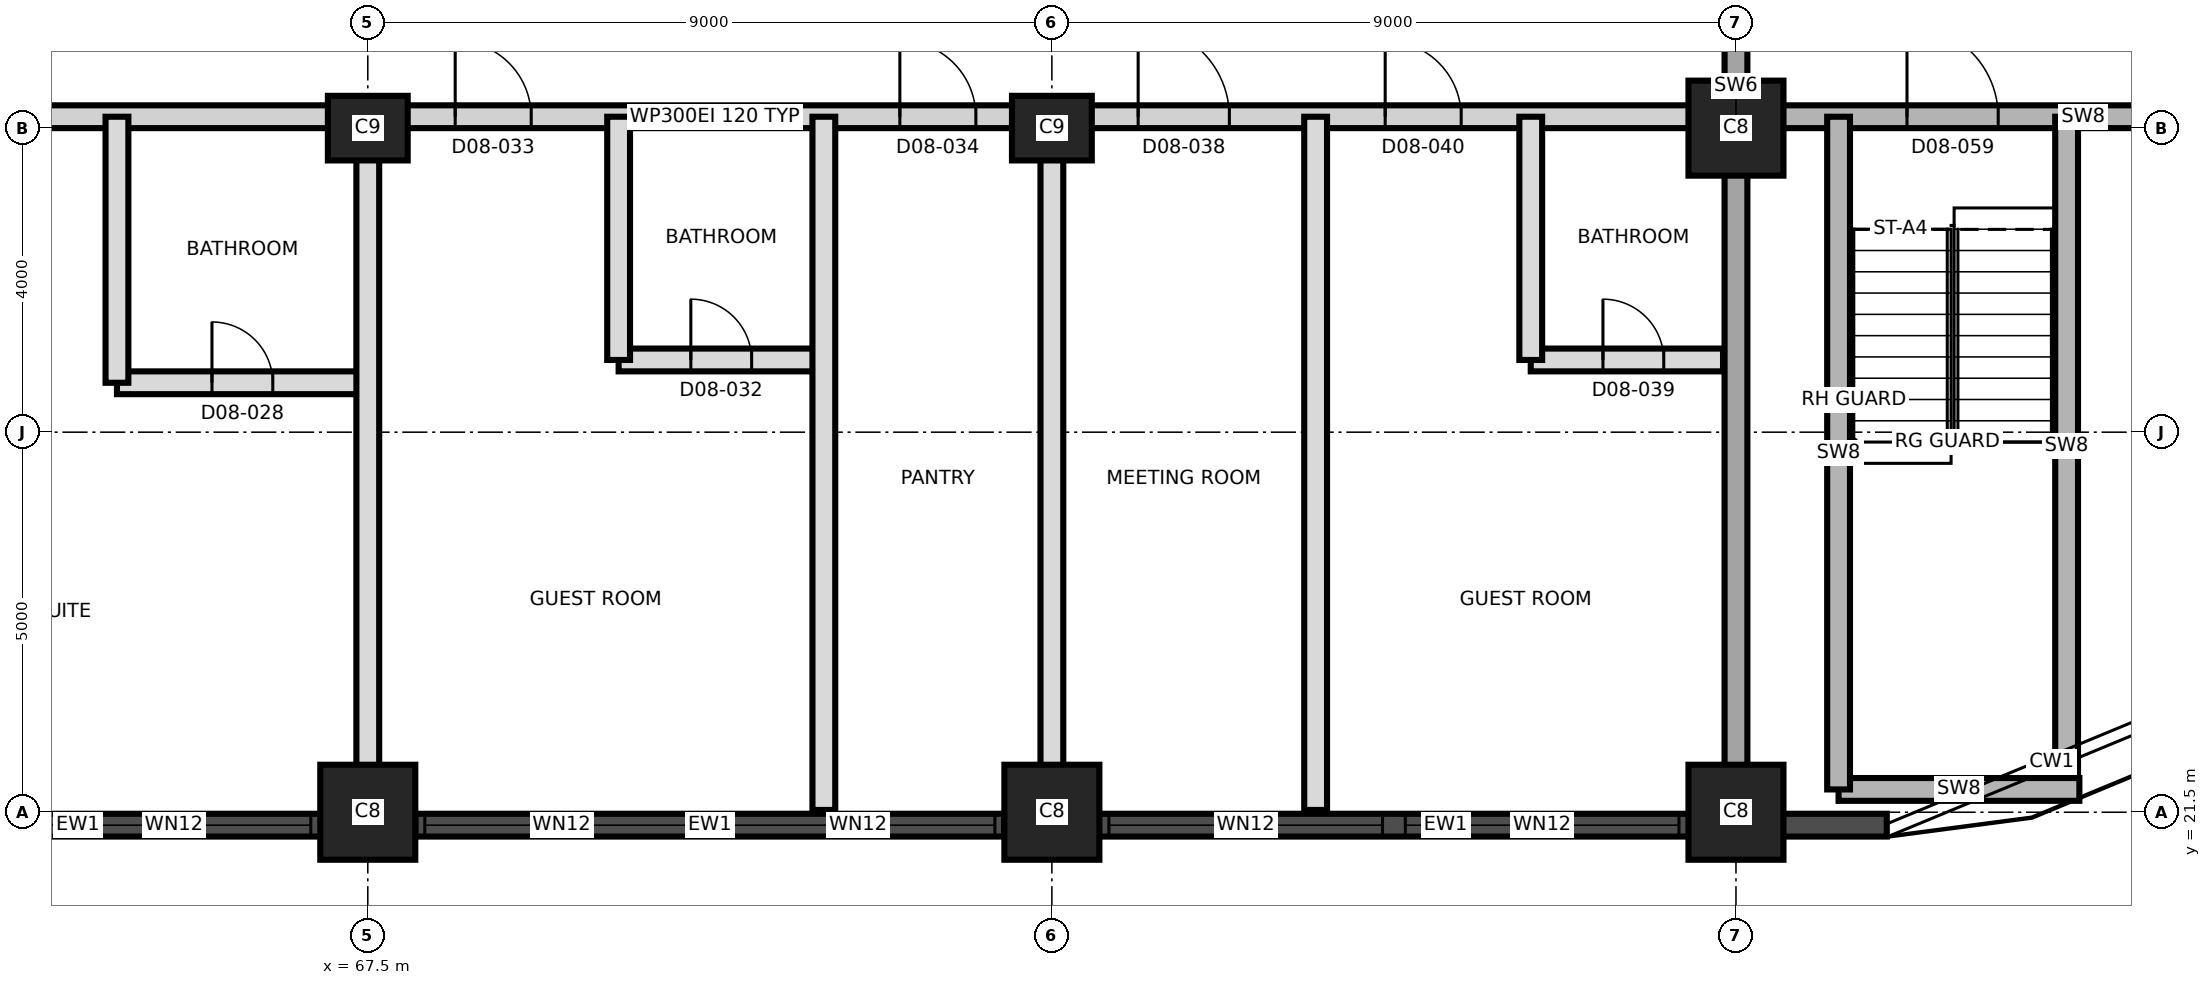
"""IFC4 building model, lengths in metres.
Left out: names, types, materials, properties, quantities, classifications, styles, units other than length and angle.
Written with IfcOpenShell. Run it as: python <this file> out.ifc"""

import sys

from ifc_helpers import new_model, si_unit, direction, frame, frame_2d, origin, origin_2d, place, context, subcontext, project, spatial, rectangle, extrude, element, fill, save


model = new_model("IFC4")
c1 = context("Model", 3, precision=1e-05, world=origin(), true_north=direction((0.0, 1.0)))
c2 = subcontext(c1, "Body", "Model", "MODEL_VIEW")
j1 = project(units=[si_unit("LENGTHUNIT", "METRE"), si_unit("PLANEANGLEUNIT", "RADIAN")], contexts=[c1])
p1 = place(None, origin())
s1 = spatial("IfcSite", under=j1, at=p1, CompositionType="ELEMENT")
p2 = place(p1, origin())
s2 = spatial("IfcBuilding", under=s1, at=p2, CompositionType="ELEMENT")
p3 = place(p2, frame((0.0, 0.0, 98.2)))
s3 = spatial("IfcBuildingStorey", under=s2, at=p3, CompositionType="ELEMENT", Elevation=98.2)
for number, where, z_axis, x_axis in (
    (1, (67.5, 21.5, 0.0), (0.0, 0.0, 1.0), (1.0, 0.0, 0.0)),
    (2, (76.5, 21.5, 0.0), (0.0, 0.0, 1.0), (1.0, 0.0, 0.0)),
    (3, (85.5, 21.5, 0.0), (0.0, 0.0, 1.0), (1.0, 0.0, 0.0)),
):
    element("IfcColumn", number, at=place(p3, frame(where, z_axis=z_axis, x_axis=x_axis)), inside=s3, PredefinedType="COLUMN", context=c2, shape_type="SweptSolid", body=[
        extrude(rectangle(XDim=1.25, YDim=1.25, at=origin_2d()), origin(), (0.0, 0.0, 1.0), 3.7),
    ])
for number, where, z_axis, x_axis in (
    (4, (67.5, 30.5, 0.0), (0.0, 0.0, 1.0), (1.0, 0.0, 0.0)),
    (5, (76.5, 30.5, 0.0), (0.0, 0.0, 1.0), (1.0, 0.0, 0.0)),
):
    element("IfcColumn", number, at=place(p3, frame(where, z_axis=z_axis, x_axis=x_axis)), inside=s3, PredefinedType="COLUMN", context=c2, shape_type="SweptSolid", body=[
        extrude(rectangle(XDim=1.05, YDim=0.85, at=origin_2d()), origin(), (0.0, 0.0, 1.0), 3.7),
    ])
p4 = place(p3, frame((85.5, 30.5, 0.0), z_axis=(0.0, 0.0, 1.0), x_axis=(1.0, 0.0, 0.0)))
e6 = element("IfcColumn", 6, at=p4, inside=s3, PredefinedType="COLUMN", context=c2, shape_type="SweptSolid", body=[
    extrude(rectangle(XDim=1.25, YDim=1.25, at=origin_2d()), origin(), (0.0, 0.0, 1.0), 3.7),
])
p5 = place(p3, frame((85.5, 21.53, 0.0), z_axis=(0.0, 0.0, 1.0), x_axis=(0.0, 1.0, 0.0)))
e7 = element("IfcWall", 7, at=p5, inside=s3, PredefinedType="SHEAR", context=c2, shape_type="SweptSolid", body=[
    extrude(rectangle(XDim=17.94, YDim=0.3, at=frame_2d((8.97, 0.0))), origin(), (0.0, 0.0, 1.0), 3.7),
])
p6 = place(p5, frame((10.17, 0.0, 0.0)))
e8 = element("IfcOpeningElement", 8, at=p6, cuts=e7, PredefinedType="OPENING", context=c2, shape_type="SweptSolid", body=[
    extrude(rectangle(XDim=1.4, YDim=2.1, at=frame_2d((0.7, 1.05))), frame((0.0, 0.16, 0.0), z_axis=(0.0, -1.0, 0.0), x_axis=(1.0, 0.0, 0.0)), (0.0, 0.0, 1.0), 0.32),
])
p7 = place(p3, frame((59.25, 21.33, 0.0), z_axis=(0.0, 0.0, 1.0), x_axis=(1.0, 0.0, 0.0)))
e9 = element("IfcWall", 9, at=p7, inside=s3, PredefinedType="SOLIDWALL", context=c2, shape_type="SweptSolid", body=[
    extrude(rectangle(XDim=8.875, YDim=0.3, at=frame_2d((4.438, 0.0))), origin(), (0.0, 0.0, 1.0), 3.4),
])
p8 = place(p7, frame((0.975, 0.0, 0.3)))
e10 = element("IfcOpeningElement", 10, at=p8, cuts=e9, PredefinedType="OPENING", context=c2, shape_type="SweptSolid", body=[
    extrude(rectangle(XDim=1.8, YDim=2.4, at=frame_2d((0.9, 1.2))), frame((0.0, 0.16, 0.0), z_axis=(0.0, -1.0, 0.0), x_axis=(1.0, 0.0, 0.0)), (0.0, 0.0, 1.0), 0.32),
])
p9 = place(p7, frame((3.9, 0.0, 0.9)))
e11 = element("IfcOpeningElement", 11, at=p9, cuts=e9, PredefinedType="OPENING", context=c2, shape_type="SweptSolid", body=[
    extrude(rectangle(XDim=3.6, YDim=1.5, at=frame_2d((1.8, 0.75))), frame((0.0, 0.16, 0.0), z_axis=(0.0, -1.0, 0.0), x_axis=(1.0, 0.0, 0.0)), (0.0, 0.0, 1.0), 0.32),
])
p10 = place(p3, frame((68.125, 21.33, 0.0), z_axis=(0.0, 0.0, 1.0), x_axis=(1.0, 0.0, 0.0)))
e12 = element("IfcWall", 12, at=p10, inside=s3, PredefinedType="SOLIDWALL", context=c2, shape_type="SweptSolid", body=[
    extrude(rectangle(XDim=7.75, YDim=0.3, at=frame_2d((3.875, 0.0))), origin(), (0.0, 0.0, 1.0), 2.75),
])
p11 = place(p10, frame((0.125, 0.0, 0.9)))
e13 = element("IfcOpeningElement", 13, at=p11, cuts=e12, PredefinedType="OPENING", context=c2, shape_type="SweptSolid", body=[
    extrude(rectangle(XDim=3.6, YDim=1.5, at=frame_2d((1.8, 0.75))), frame((0.0, 0.16, 0.0), z_axis=(0.0, -1.0, 0.0), x_axis=(1.0, 0.0, 0.0)), (0.0, 0.0, 1.0), 0.32),
])
p12 = place(p10, frame((4.025, 0.0, 0.9)))
e14 = element("IfcOpeningElement", 14, at=p12, cuts=e12, PredefinedType="OPENING", context=c2, shape_type="SweptSolid", body=[
    extrude(rectangle(XDim=3.6, YDim=1.5, at=frame_2d((1.8, 0.75))), frame((0.0, 0.16, 0.0), z_axis=(0.0, -1.0, 0.0), x_axis=(1.0, 0.0, 0.0)), (0.0, 0.0, 1.0), 0.32),
])
p13 = place(p3, frame((75.875, 21.33, 0.0), z_axis=(0.0, 0.0, 1.0), x_axis=(1.0, 0.0, 0.0)))
e15 = element("IfcWall", 15, at=p13, inside=s3, PredefinedType="SOLIDWALL", context=c2, shape_type="SweptSolid", body=[
    extrude(rectangle(XDim=11.609, YDim=0.3, at=frame_2d((5.805, 0.0))), origin(), (0.0, 0.0, 1.0), 3.4),
])
p14 = place(p13, frame((1.375, 0.0, 0.9)))
e16 = element("IfcOpeningElement", 16, at=p14, cuts=e15, PredefinedType="OPENING", context=c2, shape_type="SweptSolid", body=[
    extrude(rectangle(XDim=3.6, YDim=1.5, at=frame_2d((1.8, 0.75))), frame((0.0, 0.16, 0.0), z_axis=(0.0, -1.0, 0.0), x_axis=(1.0, 0.0, 0.0)), (0.0, 0.0, 1.0), 0.32),
])
p15 = place(p13, frame((5.275, 0.0, 0.9)))
e17 = element("IfcOpeningElement", 17, at=p15, cuts=e15, PredefinedType="OPENING", context=c2, shape_type="SweptSolid", body=[
    extrude(rectangle(XDim=3.6, YDim=1.5, at=frame_2d((1.8, 0.75))), frame((0.0, 0.16, 0.0), z_axis=(0.0, -1.0, 0.0), x_axis=(1.0, 0.0, 0.0)), (0.0, 0.0, 1.0), 0.32),
])
p16 = place(p3, frame((86.85, 21.8, 0.0), z_axis=(0.0, 0.0, 1.0), x_axis=(1.0, 0.0, 0.0)))
e18 = element("IfcWall", 18, at=p16, inside=s3, PredefinedType="SHEAR", context=c2, shape_type="SweptSolid", body=[
    extrude(rectangle(XDim=3.168, YDim=0.3, at=frame_2d((1.584, 0.0))), origin(), (0.0, 0.0, 1.0), 3.4),
])
p17 = place(p3, frame((64.2, 27.15, 0.0), z_axis=(0.0, 0.0, 1.0), x_axis=(1.0, 0.0, 0.0)))
e19 = element("IfcWall", 19, at=p17, inside=s3, PredefinedType="PARTITIONING", context=c2, shape_type="SweptSolid", body=[
    extrude(rectangle(XDim=3.3, YDim=0.3, at=frame_2d((1.65, 0.0))), origin(), (0.0, 0.0, 1.0), 3.4),
])
p18 = place(p17, frame((1.25, 0.0, 0.0)))
e20 = element("IfcOpeningElement", 20, at=p18, cuts=e19, PredefinedType="OPENING", context=c2, shape_type="SweptSolid", body=[
    extrude(rectangle(XDim=0.8, YDim=2.1, at=frame_2d((0.4, 1.05))), frame((0.0, 0.16, 0.0), z_axis=(0.0, -1.0, 0.0), x_axis=(1.0, 0.0, 0.0)), (0.0, 0.0, 1.0), 0.32),
])
p19 = place(p3, frame((70.8, 27.45, 0.0), z_axis=(0.0, 0.0, 1.0), x_axis=(1.0, 0.0, 0.0)))
e21 = element("IfcWall", 21, at=p19, inside=s3, PredefinedType="PARTITIONING", context=c2, shape_type="SweptSolid", body=[
    extrude(rectangle(XDim=2.7, YDim=0.3, at=frame_2d((1.35, 0.0))), origin(), (0.0, 0.0, 1.0), 3.4),
])
p20 = place(p19, frame((0.95, 0.0, 0.0)))
e22 = element("IfcOpeningElement", 22, at=p20, cuts=e21, PredefinedType="OPENING", context=c2, shape_type="SweptSolid", body=[
    extrude(rectangle(XDim=0.8, YDim=2.1, at=frame_2d((0.4, 1.05))), frame((0.0, 0.16, 0.0), z_axis=(0.0, -1.0, 0.0), x_axis=(1.0, 0.0, 0.0)), (0.0, 0.0, 1.0), 0.32),
])
p21 = place(p3, frame((82.8, 27.45, 0.0), z_axis=(0.0, 0.0, 1.0), x_axis=(1.0, 0.0, 0.0)))
e23 = element("IfcWall", 23, at=p21, inside=s3, PredefinedType="PARTITIONING", context=c2, shape_type="SweptSolid", body=[
    extrude(rectangle(XDim=2.53, YDim=0.3, at=frame_2d((1.265, 0.0))), origin(), (0.0, 0.0, 1.0), 3.4),
])
p22 = place(p21, frame((0.95, 0.0, 0.0)))
e24 = element("IfcOpeningElement", 24, at=p22, cuts=e23, PredefinedType="OPENING", context=c2, shape_type="SweptSolid", body=[
    extrude(rectangle(XDim=0.8, YDim=2.1, at=frame_2d((0.4, 1.05))), frame((0.0, 0.16, 0.0), z_axis=(0.0, -1.0, 0.0), x_axis=(1.0, 0.0, 0.0)), (0.0, 0.0, 1.0), 0.32),
])
p23 = place(p3, frame((58.8, 30.65, 0.0), z_axis=(0.0, 0.0, 1.0), x_axis=(1.0, 0.0, 0.0)))
e25 = element("IfcWall", 25, at=p23, inside=s3, PredefinedType="PARTITIONING", context=c2, shape_type="SweptSolid", body=[
    extrude(rectangle(XDim=26.53, YDim=0.3, at=frame_2d((13.265, 0.0))), origin(), (0.0, 0.0, 1.0), 3.4),
])
p24 = place(p23, frame((2.05, 0.0, 0.0)))
e26 = element("IfcOpeningElement", 26, at=p24, cuts=e25, PredefinedType="OPENING", context=c2, shape_type="SweptSolid", body=[
    extrude(rectangle(XDim=1.0, YDim=2.4, at=frame_2d((0.5, 1.2))), frame((0.0, 0.16, 0.0), z_axis=(0.0, -1.0, 0.0), x_axis=(1.0, 0.0, 0.0)), (0.0, 0.0, 1.0), 0.32),
])
p25 = place(p23, frame((9.85, 0.0, 0.0)))
e27 = element("IfcOpeningElement", 27, at=p25, cuts=e25, PredefinedType="OPENING", context=c2, shape_type="SweptSolid", body=[
    extrude(rectangle(XDim=1.0, YDim=2.1, at=frame_2d((0.5, 1.05))), frame((0.0, 0.16, 0.0), z_axis=(0.0, -1.0, 0.0), x_axis=(1.0, 0.0, 0.0)), (0.0, 0.0, 1.0), 0.32),
])
p26 = place(p23, frame((15.7, 0.0, 0.0)))
e28 = element("IfcOpeningElement", 28, at=p26, cuts=e25, PredefinedType="OPENING", context=c2, shape_type="SweptSolid", body=[
    extrude(rectangle(XDim=1.0, YDim=2.1, at=frame_2d((0.5, 1.05))), frame((0.0, 0.16, 0.0), z_axis=(0.0, -1.0, 0.0), x_axis=(1.0, 0.0, 0.0)), (0.0, 0.0, 1.0), 0.32),
])
p27 = place(p23, frame((18.835, 0.0, 0.0)))
e29 = element("IfcOpeningElement", 29, at=p27, cuts=e25, PredefinedType="OPENING", context=c2, shape_type="SweptSolid", body=[
    extrude(rectangle(XDim=1.2, YDim=2.1, at=frame_2d((0.6, 1.05))), frame((0.0, 0.16, 0.0), z_axis=(0.0, -1.0, 0.0), x_axis=(1.0, 0.0, 0.0)), (0.0, 0.0, 1.0), 0.32),
])
p28 = place(p23, frame((22.085, 0.0, 0.0)))
e30 = element("IfcOpeningElement", 30, at=p28, cuts=e25, PredefinedType="OPENING", context=c2, shape_type="SweptSolid", body=[
    extrude(rectangle(XDim=1.0, YDim=2.1, at=frame_2d((0.5, 1.05))), frame((0.0, 0.16, 0.0), z_axis=(0.0, -1.0, 0.0), x_axis=(1.0, 0.0, 0.0)), (0.0, 0.0, 1.0), 0.32),
])
p29 = place(p3, frame((85.67, 30.65, 0.0), z_axis=(0.0, 0.0, 1.0), x_axis=(1.0, 0.0, 0.0)))
e31 = element("IfcWall", 31, at=p29, inside=s3, PredefinedType="SHEAR", context=c2, shape_type="SweptSolid", body=[
    extrude(rectangle(XDim=8.8, YDim=0.3, at=frame_2d((4.4, 0.0))), origin(), (0.0, 0.0, 1.0), 3.4),
])
p30 = place(p29, frame((2.08, 0.0, 0.0)))
e32 = element("IfcOpeningElement", 32, at=p30, cuts=e31, PredefinedType="OPENING", context=c2, shape_type="SweptSolid", body=[
    extrude(rectangle(XDim=1.2, YDim=2.1, at=frame_2d((0.6, 1.05))), frame((0.0, 0.16, 0.0), z_axis=(0.0, -1.0, 0.0), x_axis=(1.0, 0.0, 0.0)), (0.0, 0.0, 1.0), 0.32),
])
p31 = place(p29, frame((5.63, 0.0, 0.0)))
e33 = element("IfcOpeningElement", 33, at=p31, cuts=e31, PredefinedType="OPENING", context=c2, shape_type="SweptSolid", body=[
    extrude(rectangle(XDim=1.0, YDim=2.1, at=frame_2d((0.5, 1.05))), frame((0.0, 0.16, 0.0), z_axis=(0.0, -1.0, 0.0), x_axis=(1.0, 0.0, 0.0)), (0.0, 0.0, 1.0), 0.32),
])
p32 = place(p3, frame((64.2, 27.15, 0.0), z_axis=(0.0, 0.0, 1.0), x_axis=(0.0, 1.0, 0.0)))
e34 = element("IfcWall", 34, at=p32, inside=s3, PredefinedType="PARTITIONING", context=c2, shape_type="SweptSolid", body=[
    extrude(rectangle(XDim=3.5, YDim=0.3, at=frame_2d((1.75, 0.0))), origin(), (0.0, 0.0, 1.0), 3.4),
])
p33 = place(p3, frame((67.5, 21.53, 0.0), z_axis=(0.0, 0.0, 1.0), x_axis=(0.0, 1.0, 0.0)))
e35 = element("IfcWall", 35, at=p33, inside=s3, PredefinedType="PARTITIONING", context=c2, shape_type="SweptSolid", body=[
    extrude(rectangle(XDim=9.12, YDim=0.3, at=frame_2d((4.56, 0.0))), origin(), (0.0, 0.0, 1.0), 3.4),
])
p34 = place(p3, frame((70.8, 27.45, 0.0), z_axis=(0.0, 0.0, 1.0), x_axis=(0.0, 1.0, 0.0)))
e36 = element("IfcWall", 36, at=p34, inside=s3, PredefinedType="PARTITIONING", context=c2, shape_type="SweptSolid", body=[
    extrude(rectangle(XDim=3.2, YDim=0.3, at=frame_2d((1.6, 0.0))), origin(), (0.0, 0.0, 1.0), 3.4),
])
for number, where, z_axis, x_axis in (
    (37, (73.5, 21.53, 0.0), (0.0, 0.0, 1.0), (0.0, 1.0, 0.0)),
    (38, (76.5, 21.53, 0.0), (0.0, 0.0, 1.0), (0.0, 1.0, 0.0)),
    (39, (79.97, 21.53, 0.0), (0.0, 0.0, 1.0), (0.0, 1.0, 0.0)),
):
    element("IfcWall", number, at=place(p3, frame(where, z_axis=z_axis, x_axis=x_axis)), inside=s3, PredefinedType="PARTITIONING", context=c2, shape_type="SweptSolid", body=[
        extrude(rectangle(XDim=9.12, YDim=0.3, at=frame_2d((4.56, 0.0))), origin(), (0.0, 0.0, 1.0), 3.4),
    ])
p35 = place(p3, frame((82.8, 27.45, 0.0), z_axis=(0.0, 0.0, 1.0), x_axis=(0.0, 1.0, 0.0)))
e40 = element("IfcWall", 40, at=p35, inside=s3, PredefinedType="PARTITIONING", context=c2, shape_type="SweptSolid", body=[
    extrude(rectangle(XDim=3.2, YDim=0.3, at=frame_2d((1.6, 0.0))), origin(), (0.0, 0.0, 1.0), 3.4),
])
p36 = place(p3, frame((86.85, 21.8, 0.0), z_axis=(0.0, 0.0, 1.0), x_axis=(0.0, 1.0, 0.0)))
e41 = element("IfcWall", 41, at=p36, inside=s3, PredefinedType="SHEAR", context=c2, shape_type="SweptSolid", body=[
    extrude(rectangle(XDim=8.85, YDim=0.3, at=frame_2d((4.425, 0.0))), origin(), (0.0, 0.0, 1.0), 3.4),
])
p37 = place(p3, frame((89.85, 21.997, 0.0), z_axis=(0.0, 0.0, 1.0), x_axis=(0.0, 1.0, 0.0)))
e42 = element("IfcWall", 42, at=p37, inside=s3, PredefinedType="SHEAR", context=c2, shape_type="SweptSolid", body=[
    extrude(rectangle(XDim=8.653, YDim=0.3, at=frame_2d((4.326, 0.0))), origin(), (0.0, 0.0, 1.0), 3.4),
])
p38 = place(p9, origin())
e43 = element("IfcWindow", 43, at=p38, inside=s3, PartitioningType="SINGLE_PANEL", PredefinedType="WINDOW", context=c2, shape_type="SweptSolid", body=[
    extrude(rectangle(XDim=3.6, YDim=1.5, at=frame_2d((1.8, 0.75))), frame((0.0, 0.03, 0.0), z_axis=(0.0, -1.0, 0.0), x_axis=(1.0, 0.0, 0.0)), (0.0, 0.0, 1.0), 0.06),
])
fill(e11, e43)
p39 = place(p11, origin())
e44 = element("IfcWindow", 44, at=p39, inside=s3, PartitioningType="SINGLE_PANEL", PredefinedType="WINDOW", context=c2, shape_type="SweptSolid", body=[
    extrude(rectangle(XDim=3.6, YDim=1.5, at=frame_2d((1.8, 0.75))), frame((0.0, 0.03, 0.0), z_axis=(0.0, -1.0, 0.0), x_axis=(1.0, 0.0, 0.0)), (0.0, 0.0, 1.0), 0.06),
])
fill(e13, e44)
p40 = place(p12, origin())
e45 = element("IfcWindow", 45, at=p40, inside=s3, PartitioningType="SINGLE_PANEL", PredefinedType="WINDOW", context=c2, shape_type="SweptSolid", body=[
    extrude(rectangle(XDim=3.6, YDim=1.5, at=frame_2d((1.8, 0.75))), frame((0.0, 0.03, 0.0), z_axis=(0.0, -1.0, 0.0), x_axis=(1.0, 0.0, 0.0)), (0.0, 0.0, 1.0), 0.06),
])
fill(e14, e45)
p41 = place(p14, origin())
e46 = element("IfcWindow", 46, at=p41, inside=s3, PartitioningType="SINGLE_PANEL", PredefinedType="WINDOW", context=c2, shape_type="SweptSolid", body=[
    extrude(rectangle(XDim=3.6, YDim=1.5, at=frame_2d((1.8, 0.75))), frame((0.0, 0.03, 0.0), z_axis=(0.0, -1.0, 0.0), x_axis=(1.0, 0.0, 0.0)), (0.0, 0.0, 1.0), 0.06),
])
fill(e16, e46)
p42 = place(p15, origin())
e47 = element("IfcWindow", 47, at=p42, inside=s3, PartitioningType="SINGLE_PANEL", PredefinedType="WINDOW", context=c2, shape_type="SweptSolid", body=[
    extrude(rectangle(XDim=3.6, YDim=1.5, at=frame_2d((1.8, 0.75))), frame((0.0, 0.03, 0.0), z_axis=(0.0, -1.0, 0.0), x_axis=(1.0, 0.0, 0.0)), (0.0, 0.0, 1.0), 0.06),
])
fill(e17, e47)
p43 = place(p18, origin())
e48 = element("IfcDoor", 48, at=p43, inside=s3, OperationType="SINGLE_SWING_LEFT", PredefinedType="DOOR", context=c2, shape_type="SweptSolid", body=[
    extrude(rectangle(XDim=0.8, YDim=2.1, at=frame_2d((0.4, 1.05))), frame((0.0, 0.025, 0.0), z_axis=(0.0, -1.0, 0.0), x_axis=(1.0, 0.0, 0.0)), (0.0, 0.0, 1.0), 0.05),
])
fill(e20, e48)
p44 = place(p20, origin())
e49 = element("IfcDoor", 49, at=p44, inside=s3, OperationType="SINGLE_SWING_RIGHT", PredefinedType="DOOR", context=c2, shape_type="SweptSolid", body=[
    extrude(rectangle(XDim=0.8, YDim=2.1, at=frame_2d((0.4, 1.05))), frame((0.0, 0.025, 0.0), z_axis=(0.0, -1.0, 0.0), x_axis=(1.0, 0.0, 0.0)), (0.0, 0.0, 1.0), 0.05),
])
fill(e22, e49)
p45 = place(p25, origin())
e50 = element("IfcDoor", 50, at=p45, inside=s3, OperationType="SINGLE_SWING_LEFT", PredefinedType="DOOR", context=c2, shape_type="SweptSolid", body=[
    extrude(rectangle(XDim=1.0, YDim=2.1, at=frame_2d((0.5, 1.05))), frame((0.0, 0.025, 0.0), z_axis=(0.0, -1.0, 0.0), x_axis=(1.0, 0.0, 0.0)), (0.0, 0.0, 1.0), 0.05),
])
fill(e27, e50)
p46 = place(p26, origin())
e51 = element("IfcDoor", 51, at=p46, inside=s3, OperationType="SINGLE_SWING_LEFT", PredefinedType="DOOR", context=c2, shape_type="SweptSolid", body=[
    extrude(rectangle(XDim=1.0, YDim=2.1, at=frame_2d((0.5, 1.05))), frame((0.0, 0.025, 0.0), z_axis=(0.0, -1.0, 0.0), x_axis=(1.0, 0.0, 0.0)), (0.0, 0.0, 1.0), 0.05),
])
fill(e28, e51)
p47 = place(p27, origin())
e52 = element("IfcDoor", 52, at=p47, inside=s3, OperationType="SINGLE_SWING_LEFT", PredefinedType="DOOR", context=c2, shape_type="SweptSolid", body=[
    extrude(rectangle(XDim=1.2, YDim=2.1, at=frame_2d((0.6, 1.05))), frame((0.0, 0.025, 0.0), z_axis=(0.0, -1.0, 0.0), x_axis=(1.0, 0.0, 0.0)), (0.0, 0.0, 1.0), 0.05),
])
fill(e29, e52)
p48 = place(p22, origin())
e53 = element("IfcDoor", 53, at=p48, inside=s3, OperationType="SINGLE_SWING_LEFT", PredefinedType="DOOR", context=c2, shape_type="SweptSolid", body=[
    extrude(rectangle(XDim=0.8, YDim=2.1, at=frame_2d((0.4, 1.05))), frame((0.0, 0.025, 0.0), z_axis=(0.0, -1.0, 0.0), x_axis=(1.0, 0.0, 0.0)), (0.0, 0.0, 1.0), 0.05),
])
fill(e24, e53)
p49 = place(p28, origin())
e54 = element("IfcDoor", 54, at=p49, inside=s3, OperationType="SINGLE_SWING_RIGHT", PredefinedType="DOOR", context=c2, shape_type="SweptSolid", body=[
    extrude(rectangle(XDim=1.0, YDim=2.1, at=frame_2d((0.5, 1.05))), frame((0.0, 0.025, 0.0), z_axis=(0.0, -1.0, 0.0), x_axis=(1.0, 0.0, 0.0)), (0.0, 0.0, 1.0), 0.05),
])
fill(e30, e54)
p50 = place(p30, origin())
e55 = element("IfcDoor", 55, at=p50, inside=s3, OperationType="SINGLE_SWING_LEFT", PredefinedType="DOOR", context=c2, shape_type="SweptSolid", body=[
    extrude(rectangle(XDim=1.2, YDim=2.1, at=frame_2d((0.6, 1.05))), frame((0.0, 0.025, 0.0), z_axis=(0.0, -1.0, 0.0), x_axis=(1.0, 0.0, 0.0)), (0.0, 0.0, 1.0), 0.05),
])
fill(e32, e55)
save(model, sys.argv[1])
